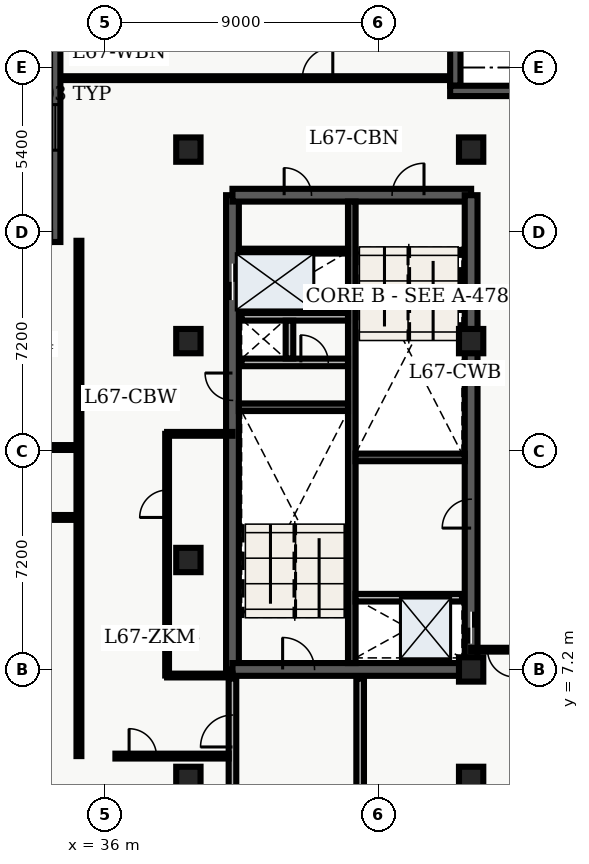
"""IFC4 building model, lengths in metres.
Left out: names, types, materials, properties, quantities, classifications, styles, units other than length and angle.
Written with IfcOpenShell. Run it as: python <this file> out.ifc"""

import sys

from ifc_helpers import new_model, entity, si_unit, converted_unit, direction, frame, origin_with_axes, origin_2d_with_axis, place, context, subcontext, project, spatial, polyline, rectangle, outline, extrude, element, fill, save


model = new_model("IFC4")
c1 = context("Model", 3, precision=1e-05, world=origin_with_axes(), true_north=direction((0.0, 1.0)))
c2 = subcontext(c1, "Body", "Model", "MODEL_VIEW")
j1 = project(units=[si_unit("LENGTHUNIT", "METRE"), converted_unit("PLANEANGLEUNIT", "DEGREE", entity("IfcPlaneAngleMeasure", 0.017), si_unit("PLANEANGLEUNIT", "RADIAN"), dimensions=[0, 0, 0, 0, 0, 0, 0])], contexts=[c1])
p1 = place(None, origin_with_axes())
s1 = spatial("IfcSite", under=j1, at=p1, CompositionType="ELEMENT")
p2 = place(p1, origin_with_axes())
s2 = spatial("IfcBuilding", under=s1, at=p2, CompositionType="ELEMENT")
p3 = place(p2, frame((0.0, 0.0, 272.4), z_axis=(0.0, 0.0, 1.0), x_axis=(1.0, 0.0, 0.0)))
s3 = spatial("IfcBuildingStorey", under=s2, at=p3, CompositionType="ELEMENT", Elevation=272.4)
p4 = place(p3, frame((40.2, 7.2, 0.0), z_axis=(0.0, 0.0, 1.0), x_axis=(0.0, 1.0, 0.0)))
e1 = element("IfcWall", 1, at=p4, inside=s3, PredefinedType="SHEAR", context=c2, shape_type="SweptSolid", body=[
    extrude(outline(polyline([(0.0, -0.21), (15.6, -0.21), (15.6, 0.21), (0.0, 0.21), (0.0, -0.21)])), origin_with_axes(), (0.0, 0.0, 1.0), 3.66),
])
p5 = place(p4, frame((12.75, 0.0, 0.0), z_axis=(0.0, 0.0, 1.0), x_axis=(1.0, 0.0, 0.0)))
e2 = element("IfcOpeningElement", 2, at=p5, cuts=e1, PredefinedType="OPENING", context=c2, shape_type="SweptSolid", body=[
    extrude(rectangle(XDim=1.2, YDim=0.44, at=origin_2d_with_axis()), origin_with_axes(), (0.0, 0.0, 1.0), 2.15),
])
p6 = place(p4, frame((9.3, 0.0, 0.0), z_axis=(0.0, 0.0, 1.0), x_axis=(1.0, 0.0, 0.0)))
e3 = element("IfcOpeningElement", 3, at=p6, cuts=e1, PredefinedType="OPENING", context=c2, shape_type="SweptSolid", body=[
    extrude(rectangle(XDim=0.9, YDim=0.44, at=origin_2d_with_axis()), origin_with_axes(), (0.0, 0.0, 1.0), 2.15),
])
p7 = place(p3, frame((40.2, 7.2, 0.0), z_axis=(0.0, 0.0, 1.0), x_axis=(1.0, 0.0, 0.0)))
e4 = element("IfcWall", 4, at=p7, inside=s3, PredefinedType="SHEAR", context=c2, shape_type="SweptSolid", body=[
    extrude(outline(polyline([(0.0, -0.21), (7.85, -0.21), (7.85, 0.21), (0.0, 0.21), (0.0, -0.21)])), origin_with_axes(), (0.0, 0.0, 1.0), 3.66),
])
p8 = place(p7, frame((2.175, 0.0, 0.0), z_axis=(0.0, 0.0, 1.0), x_axis=(1.0, 0.0, 0.0)))
e5 = element("IfcOpeningElement", 5, at=p8, cuts=e4, PredefinedType="OPENING", context=c2, shape_type="SweptSolid", body=[
    extrude(rectangle(XDim=1.05, YDim=0.44, at=origin_2d_with_axis()), origin_with_axes(), (0.0, 0.0, 1.0), 2.15),
])
p9 = place(p3, frame((40.2, 22.8, 0.0), z_axis=(0.0, 0.0, 1.0), x_axis=(1.0, 0.0, 0.0)))
e6 = element("IfcWall", 6, at=p9, inside=s3, PredefinedType="SHEAR", context=c2, shape_type="SweptSolid", body=[
    extrude(outline(polyline([(0.0, -0.21), (7.85, -0.21), (7.85, 0.21), (0.0, 0.21), (0.0, -0.21)])), origin_with_axes(), (0.0, 0.0, 1.0), 3.66),
])
p10 = place(p9, frame((5.775, 0.0, 0.0), z_axis=(0.0, 0.0, 1.0), x_axis=(1.0, 0.0, 0.0)))
e7 = element("IfcOpeningElement", 7, at=p10, cuts=e6, PredefinedType="OPENING", context=c2, shape_type="SweptSolid", body=[
    extrude(rectangle(XDim=1.05, YDim=0.44, at=origin_2d_with_axis()), origin_with_axes(), (0.0, 0.0, 1.0), 2.15),
])
p11 = place(p9, frame((2.15, 0.0, 0.0), z_axis=(0.0, 0.0, 1.0), x_axis=(1.0, 0.0, 0.0)))
e8 = element("IfcOpeningElement", 8, at=p11, cuts=e6, PredefinedType="OPENING", context=c2, shape_type="SweptSolid", body=[
    extrude(rectangle(XDim=0.9, YDim=0.44, at=origin_2d_with_axis()), origin_with_axes(), (0.0, 0.0, 1.0), 2.15),
])
p12 = place(p3, frame((48.05, 7.2, 0.0), z_axis=(0.0, 0.0, 1.0), x_axis=(0.0, 1.0, 0.0)))
e9 = element("IfcWall", 9, at=p12, inside=s3, PredefinedType="SHEAR", context=c2, shape_type="SweptSolid", body=[
    extrude(outline(polyline([(0.0, -0.21), (15.6, -0.21), (15.6, 0.21), (0.0, 0.21), (0.0, -0.21)])), origin_with_axes(), (0.0, 0.0, 1.0), 3.66),
])
p13 = place(p12, frame((1.375, 0.0, 0.0), z_axis=(0.0, 0.0, 1.0), x_axis=(1.0, 0.0, 0.0)))
e10 = element("IfcOpeningElement", 10, at=p13, cuts=e9, PredefinedType="OPENING", context=c2, shape_type="SweptSolid", body=[
    extrude(rectangle(XDim=1.05, YDim=0.44, at=origin_2d_with_axis()), origin_with_axes(), (0.0, 0.0, 1.0), 2.15),
])
p14 = place(p12, frame((5.125, 0.0, 0.0), z_axis=(0.0, 0.0, 1.0), x_axis=(1.0, 0.0, 0.0)))
e11 = element("IfcOpeningElement", 11, at=p14, cuts=e9, PredefinedType="OPENING", context=c2, shape_type="SweptSolid", body=[
    extrude(rectangle(XDim=0.95, YDim=0.44, at=origin_2d_with_axis()), origin_with_axes(), (0.0, 0.0, 1.0), 2.15),
])
p15 = place(p3, frame((44.125, 7.41, 0.0), z_axis=(0.0, 0.0, 1.0), x_axis=(0.0, 1.0, 0.0)))
e12 = element("IfcWall", 12, at=p15, inside=s3, PredefinedType="SHEAR", context=c2, shape_type="SweptSolid", body=[
    extrude(outline(polyline([(0.0, -0.125), (15.18, -0.125), (15.18, 0.125), (0.0, 0.125), (0.0, -0.125)])), origin_with_axes(), (0.0, 0.0, 1.0), 3.66),
])
for number, where, z_axis, x_axis in (
    (13, (40.41, 15.825, 0.0), (0.0, 0.0, 1.0), (1.0, 0.0, 0.0)),
    (14, (44.25, 14.175, 0.0), (0.0, 0.0, 1.0), (1.0, 0.0, 0.0)),
):
    element("IfcWall", number, at=place(p3, frame(where, z_axis=z_axis, x_axis=x_axis)), inside=s3, PredefinedType="SHEAR", context=c2, shape_type="SweptSolid", body=[
        extrude(outline(polyline([(0.0, -0.125), (3.59, -0.125), (3.59, 0.125), (0.0, 0.125), (0.0, -0.125)])), origin_with_axes(), (0.0, 0.0, 1.0), 3.66),
    ])
p16 = place(p3, frame((40.5, 17.3, 0.0), z_axis=(0.0, 0.0, 1.0), x_axis=(1.0, 0.0, 0.0)))
e15 = element("IfcWall", 15, at=p16, inside=s3, PredefinedType="SOLIDWALL", context=c2, shape_type="SweptSolid", body=[
    extrude(outline(polyline([(0.0, -0.125), (3.5, -0.125), (3.5, 0.125), (0.0, 0.125), (0.0, -0.125)])), origin_with_axes(), (0.0, 0.0, 1.0), 2.7),
])
p17 = place(p16, frame((2.4, 0.0, 0.0), z_axis=(0.0, 0.0, 1.0), x_axis=(1.0, 0.0, 0.0)))
e16 = element("IfcOpeningElement", 16, at=p17, cuts=e15, PredefinedType="OPENING", context=c2, shape_type="SweptSolid", body=[
    extrude(rectangle(XDim=0.9, YDim=0.27, at=origin_2d_with_axis()), origin_with_axes(), (0.0, 0.0, 1.0), 2.15),
])
p18 = place(p3, frame((40.5, 18.8, 0.0), z_axis=(0.0, 0.0, 1.0), x_axis=(1.0, 0.0, 0.0)))
e17 = element("IfcWall", 17, at=p18, inside=s3, PredefinedType="SOLIDWALL", context=c2, shape_type="SweptSolid", body=[
    extrude(outline(polyline([(0.0, -0.125), (3.5, -0.125), (3.5, 0.125), (0.0, 0.125), (0.0, -0.125)])), origin_with_axes(), (0.0, 0.0, 1.0), 2.7),
])
p19 = place(p3, frame((42.075, 17.43, 0.0), z_axis=(0.0, 0.0, 1.0), x_axis=(0.0, 1.0, 0.0)))
e18 = element("IfcWall", 18, at=p19, inside=s3, PredefinedType="SOLIDWALL", context=c2, shape_type="SweptSolid", body=[
    extrude(outline(polyline([(0.0, -0.125), (1.24, -0.125), (1.24, 0.125), (0.0, 0.125), (0.0, -0.125)])), origin_with_axes(), (0.0, 0.0, 1.0), 2.7),
])
p20 = place(p3, frame((40.2, 3.1, 0.0), z_axis=(0.0, 0.0, 1.0), x_axis=(0.0, 1.0, 0.0)))
e19 = element("IfcWall", 19, at=p20, inside=s3, PredefinedType="SOLIDWALL", context=c2, shape_type="SweptSolid", body=[
    extrude(outline(polyline([(0.0, -0.125), (3.8, -0.125), (3.8, 0.125), (0.0, 0.125), (0.0, -0.125)])), origin_with_axes(), (0.0, 0.0, 1.0), 2.7),
])
p21 = place(p20, frame((2.075, 0.0, 0.0), z_axis=(0.0, 0.0, 1.0), x_axis=(1.0, 0.0, 0.0)))
e20 = element("IfcOpeningElement", 20, at=p21, cuts=e19, PredefinedType="OPENING", context=c2, shape_type="SweptSolid", body=[
    extrude(rectangle(XDim=1.05, YDim=0.27, at=origin_2d_with_axis()), origin_with_axes(), (0.0, 0.0, 1.0), 2.15),
])
p22 = place(p3, frame((44.4, 3.1, 0.0), z_axis=(0.0, 0.0, 1.0), x_axis=(0.0, 1.0, 0.0)))
e21 = element("IfcWall", 21, at=p22, inside=s3, PredefinedType="SOLIDWALL", context=c2, shape_type="SweptSolid", body=[
    extrude(outline(polyline([(0.0, -0.125), (3.8, -0.125), (3.8, 0.125), (0.0, 0.125), (0.0, -0.125)])), origin_with_axes(), (0.0, 0.0, 1.0), 2.7),
])
for number, where, z_axis, x_axis in (
    (22, (38.75, 3.6, 0.0), (0.0, 0.0, 1.0), (1.0, 0.0, 0.0)),
    (23, (38.75, 10.8, 0.0), (0.0, 0.0, 1.0), (1.0, 0.0, 0.0)),
    (24, (38.75, 18.0, 0.0), (0.0, 0.0, 1.0), (1.0, 0.0, 0.0)),
    (25, (38.75, 24.3, 0.0), (0.0, 0.0, 1.0), (1.0, 0.0, 0.0)),
    (26, (48.05, 3.6, 0.0), (0.0, 0.0, 1.0), (1.0, 0.0, 0.0)),
    (27, (48.05, 7.2, 0.0), (0.0, 0.0, 1.0), (1.0, 0.0, 0.0)),
    (28, (48.05, 18.0, 0.0), (0.0, 0.0, 1.0), (1.0, 0.0, 0.0)),
    (29, (48.05, 24.3, 0.0), (0.0, 0.0, 1.0), (1.0, 0.0, 0.0)),
):
    element("IfcColumn", number, at=place(p3, frame(where, z_axis=z_axis, x_axis=x_axis)), inside=s3, PredefinedType="COLUMN", context=c2, shape_type="SweptSolid", body=[
        extrude(rectangle(XDim=0.8, YDim=0.8, at=origin_2d_with_axis()), origin_with_axes(), (0.0, 0.0, 1.0), 3.9),
    ])
p23 = place(p3, frame((40.5, 20.96, 0.0), z_axis=(0.0, 0.0, 1.0), x_axis=(1.0, 0.0, 0.0)))
e30 = element("IfcWall", 30, at=p23, inside=s3, PredefinedType="PARTITIONING", context=c2, shape_type="SweptSolid", body=[
    extrude(outline(polyline([(0.0, -0.08), (3.5, -0.08), (3.5, 0.08), (0.0, 0.08), (0.0, -0.08)])), origin_with_axes(), (0.0, 0.0, 1.0), 2.7),
])
p24 = place(p3, frame((44.25, 9.56, 0.0), z_axis=(0.0, 0.0, 1.0), x_axis=(1.0, 0.0, 0.0)))
e31 = element("IfcWall", 31, at=p24, inside=s3, PredefinedType="SOLIDWALL", context=c2, shape_type="SweptSolid", body=[
    extrude(outline(polyline([(0.0, -0.125), (3.5, -0.125), (3.5, 0.125), (0.0, 0.125), (0.0, -0.125)])), origin_with_axes(), (0.0, 0.0, 1.0), 2.7),
])
p25 = place(p3, frame((20.3, 12.2, 0.0), z_axis=(0.0, 0.0, 1.0), x_axis=(1.0, 0.0, 0.0)))
e32 = element("IfcWall", 32, at=p25, inside=s3, PredefinedType="PARTITIONING", context=c2, shape_type="SweptSolid", body=[
    extrude(outline(polyline([(0.0, -0.08), (14.85, -0.08), (14.85, 0.08), (0.0, 0.08), (0.0, -0.08)])), origin_with_axes(), (0.0, 0.0, 1.0), 2.7),
])
p26 = place(p25, frame((8.355, 0.0, 0.0), z_axis=(0.0, 0.0, 1.0), x_axis=(1.0, 0.0, 0.0)))
e33 = element("IfcOpeningElement", 33, at=p26, cuts=e32, PredefinedType="OPENING", context=c2, shape_type="SweptSolid", body=[
    extrude(rectangle(XDim=1.0, YDim=0.18, at=origin_2d_with_axis()), origin_with_axes(), (0.0, 0.0, 1.0), 2.15),
])
p27 = place(p3, frame((20.3, 14.5, 0.0), z_axis=(0.0, 0.0, 1.0), x_axis=(1.0, 0.0, 0.0)))
e34 = element("IfcWall", 34, at=p27, inside=s3, PredefinedType="PARTITIONING", context=c2, shape_type="SweptSolid", body=[
    extrude(outline(polyline([(0.0, -0.08), (14.85, -0.08), (14.85, 0.08), (0.0, 0.08), (0.0, -0.08)])), origin_with_axes(), (0.0, 0.0, 1.0), 2.7),
])
p28 = place(p27, frame((1.739, 0.0, 0.0), z_axis=(0.0, 0.0, 1.0), x_axis=(1.0, 0.0, 0.0)))
e35 = element("IfcOpeningElement", 35, at=p28, cuts=e34, PredefinedType="OPENING", context=c2, shape_type="SweptSolid", body=[
    extrude(rectangle(XDim=1.0, YDim=0.18, at=origin_2d_with_axis()), origin_with_axes(), (0.0, 0.0, 1.0), 2.15),
])
p29 = place(p27, frame((5.299, 0.0, 0.0), z_axis=(0.0, 0.0, 1.0), x_axis=(1.0, 0.0, 0.0)))
e36 = element("IfcOpeningElement", 36, at=p29, cuts=e34, PredefinedType="OPENING", context=c2, shape_type="SweptSolid", body=[
    extrude(rectangle(XDim=1.0, YDim=0.18, at=origin_2d_with_axis()), origin_with_axes(), (0.0, 0.0, 1.0), 2.15),
])
p30 = place(p27, frame((8.889, 0.0, 0.0), z_axis=(0.0, 0.0, 1.0), x_axis=(1.0, 0.0, 0.0)))
e37 = element("IfcOpeningElement", 37, at=p30, cuts=e34, PredefinedType="OPENING", context=c2, shape_type="SweptSolid", body=[
    extrude(rectangle(XDim=1.0, YDim=0.18, at=origin_2d_with_axis()), origin_with_axes(), (0.0, 0.0, 1.0), 2.15),
])
p31 = place(p27, frame((12.624, 0.0, 0.0), z_axis=(0.0, 0.0, 1.0), x_axis=(1.0, 0.0, 0.0)))
e38 = element("IfcOpeningElement", 38, at=p31, cuts=e34, PredefinedType="OPENING", context=c2, shape_type="SweptSolid", body=[
    extrude(rectangle(XDim=1.0, YDim=0.18, at=origin_2d_with_axis()), origin_with_axes(), (0.0, 0.0, 1.0), 2.15),
])
p32 = place(p3, frame((35.15, 4.35, 0.0), z_axis=(0.0, 0.0, 1.0), x_axis=(0.0, 1.0, 0.0)))
e39 = element("IfcWall", 39, at=p32, inside=s3, PredefinedType="PARTITIONING", context=c2, shape_type="SweptSolid", body=[
    extrude(outline(polyline([(0.0, -0.08), (16.95, -0.08), (16.95, 0.08), (0.0, 0.08), (0.0, -0.08)])), origin_with_axes(), (0.0, 0.0, 1.0), 2.7),
])
p33 = place(p3, frame((49.765, 7.85, 0.0), z_axis=(0.0, 0.0, 1.0), x_axis=(-1.0, 0.0, 0.0)))
e40 = element("IfcWall", 40, at=p33, inside=s3, PredefinedType="PARTITIONING", context=c2, shape_type="SweptSolid", body=[
    extrude(outline(polyline([(0.0, -0.062), (1.715, -0.062), (1.715, 0.062), (0.0, 0.062), (0.0, -0.062)])), origin_with_axes(), (0.0, 0.0, 1.0), 2.7),
])
p34 = place(p33, frame((0.725, 0.0, 0.0), z_axis=(0.0, 0.0, 1.0), x_axis=(1.0, 0.0, 0.0)))
e41 = element("IfcOpeningElement", 41, at=p34, cuts=e40, PredefinedType="OPENING", context=c2, shape_type="SweptSolid", body=[
    extrude(rectangle(XDim=0.9, YDim=0.145, at=origin_2d_with_axis()), origin_with_axes(), (0.0, 0.0, 1.0), 2.15),
])
p35 = place(p3, frame((34.535, 26.65, 0.0), z_axis=(0.0, 0.0, 1.0), x_axis=(1.0, 0.0, 0.0)))
e42 = element("IfcWall", 42, at=p35, inside=s3, PredefinedType="PARTITIONING", context=c2, shape_type="SweptSolid", body=[
    extrude(outline(polyline([(0.0, -0.062), (12.995, -0.062), (12.995, 0.062), (0.0, 0.062), (0.0, -0.062)])), origin_with_axes(), (0.0, 0.0, 1.0), 2.7),
])
p36 = place(p35, frame((8.465, 0.0, 0.0), z_axis=(0.0, 0.0, 1.0), x_axis=(1.0, 0.0, 0.0)))
e43 = element("IfcOpeningElement", 43, at=p36, cuts=e42, PredefinedType="OPENING", context=c2, shape_type="SweptSolid", body=[
    extrude(rectangle(XDim=1.0, YDim=0.145, at=origin_2d_with_axis()), origin_with_axes(), (0.0, 0.0, 1.0), 2.15),
])
p37 = place(p3, frame((36.35, 4.35, 0.0), z_axis=(0.0, 0.0, 1.0), x_axis=(1.0, 0.0, 0.0)))
e44 = element("IfcWall", 44, at=p37, inside=s3, PredefinedType="PARTITIONING", context=c2, shape_type="SweptSolid", body=[
    extrude(outline(polyline([(0.0, -0.08), (3.725, -0.08), (3.725, 0.08), (0.0, 0.08), (0.0, -0.08)])), origin_with_axes(), (0.0, 0.0, 1.0), 2.7),
])
p38 = place(p37, frame((0.9, 0.0, 0.0), z_axis=(0.0, 0.0, 1.0), x_axis=(1.0, 0.0, 0.0)))
e45 = element("IfcOpeningElement", 45, at=p38, cuts=e44, PredefinedType="OPENING", context=c2, shape_type="SweptSolid", body=[
    extrude(rectangle(XDim=0.9, YDim=0.18, at=origin_2d_with_axis()), origin_with_axes(), (0.0, 0.0, 1.0), 2.15),
])
for number, where, z_axis, x_axis in (
    (46, (38.05, 7.0, 0.0), (0.0, 0.0, 1.0), (1.0, 0.0, 0.0)),
    (47, (38.05, 14.95, 0.0), (0.0, 0.0, 1.0), (1.0, 0.0, 0.0)),
):
    element("IfcWall", number, at=place(p3, frame(where, z_axis=z_axis, x_axis=x_axis)), inside=s3, PredefinedType="PARTITIONING", context=c2, shape_type="SweptSolid", body=[
        extrude(outline(polyline([(0.0, -0.062), (2.15, -0.062), (2.15, 0.062), (0.0, 0.062), (0.0, -0.062)])), origin_with_axes(), (0.0, 0.0, 1.0), 2.7),
    ])
p39 = place(p3, frame((38.05, 7.0, 0.0), z_axis=(0.0, 0.0, 1.0), x_axis=(0.0, 1.0, 0.0)))
e48 = element("IfcWall", 48, at=p39, inside=s3, PredefinedType="PARTITIONING", context=c2, shape_type="SweptSolid", body=[
    extrude(outline(polyline([(0.0, -0.062), (7.95, -0.062), (7.95, 0.062), (0.0, 0.062), (0.0, -0.062)])), origin_with_axes(), (0.0, 0.0, 1.0), 2.7),
])
p40 = place(p39, frame((5.65, 0.0, 0.0), z_axis=(0.0, 0.0, 1.0), x_axis=(1.0, 0.0, 0.0)))
e49 = element("IfcOpeningElement", 49, at=p40, cuts=e48, PredefinedType="OPENING", context=c2, shape_type="SweptSolid", body=[
    extrude(rectangle(XDim=0.9, YDim=0.145, at=origin_2d_with_axis()), origin_with_axes(), (0.0, 0.0, 1.0), 2.15),
])
p41 = place(p3, frame((34.37, 21.26, 0.0), z_axis=(0.0, 0.0, 1.0), x_axis=(0.0, 1.0, 0.0)))
e50 = element("IfcWall", 50, at=p41, inside=s3, PredefinedType="SOLIDWALL", context=c2, shape_type="SweptSolid", body=[
    extrude(outline(polyline([(0.0, -0.17), (7.54, -0.17), (7.54, 0.17), (0.0, 0.17), (0.0, -0.17)])), origin_with_axes(), (0.0, 0.0, 1.0), 3.66),
])
p42 = place(p41, frame((3.77, 0.0, 0.45), z_axis=(0.0, 0.0, 1.0), x_axis=(1.0, 0.0, 0.0)))
e51 = element("IfcOpeningElement", 51, at=p42, cuts=e50, PredefinedType="OPENING", context=c2, shape_type="SweptSolid", body=[
    extrude(rectangle(XDim=1.5, YDim=0.36, at=origin_2d_with_axis()), origin_with_axes(), (0.0, 0.0, 1.0), 2.1),
])
p43 = place(p3, frame((47.53, 28.46, 0.0), z_axis=(0.0, 0.0, 1.0), x_axis=(0.0, -1.0, 0.0)))
e52 = element("IfcWall", 52, at=p43, inside=s3, PredefinedType="SOLIDWALL", context=c2, shape_type="SweptSolid", body=[
    extrude(outline(polyline([(0.0, -0.17), (2.06, -0.17), (2.06, 0.17), (0.0, 0.17), (0.0, -0.17)])), origin_with_axes(), (0.0, 0.0, 1.0), 3.66),
])
p44 = place(p3, frame((47.36, 26.23, 0.0), z_axis=(0.0, 0.0, 1.0), x_axis=(1.0, 0.0, 0.0)))
e53 = element("IfcWall", 53, at=p44, inside=s3, PredefinedType="SOLIDWALL", context=c2, shape_type="SweptSolid", body=[
    extrude(outline(polyline([(0.0, -0.17), (2.74, -0.17), (2.74, 0.17), (0.0, 0.17), (0.0, -0.17)])), origin_with_axes(), (0.0, 0.0, 1.0), 3.66),
])
p45 = place(p12, frame((1.375, 0.0, 0.0), z_axis=(0.0, 0.0, 1.0), x_axis=(1.0, 0.0, 0.0)))
e54 = element("IfcDoor", 54, at=p45, inside=s3, OperationType="SLIDING_TO_LEFT", PredefinedType="DOOR", context=c2, shape_type="SweptSolid", body=[
    extrude(rectangle(XDim=1.05, YDim=0.09, at=origin_2d_with_axis()), origin_with_axes(), (0.0, 0.0, 1.0), 2.15),
])
fill(e10, e54)
p46 = place(p4, frame((12.75, 0.0, 0.0), z_axis=(0.0, 0.0, 1.0), x_axis=(1.0, 0.0, 0.0)))
e55 = element("IfcDoor", 55, at=p46, inside=s3, OperationType="DOUBLE_DOOR_SLIDING", PredefinedType="DOOR", context=c2, shape_type="SweptSolid", body=[
    extrude(rectangle(XDim=1.2, YDim=0.09, at=origin_2d_with_axis()), origin_with_axes(), (0.0, 0.0, 1.0), 2.15),
])
fill(e2, e55)
p47 = place(p4, frame((9.3, 0.0, 0.0), z_axis=(0.0, 0.0, 1.0), x_axis=(1.0, 0.0, 0.0)))
e56 = element("IfcDoor", 56, at=p47, inside=s3, OperationType="SINGLE_SWING_RIGHT", PredefinedType="DOOR", context=c2, shape_type="SweptSolid", body=[
    extrude(rectangle(XDim=0.9, YDim=0.09, at=origin_2d_with_axis()), origin_with_axes(), (0.0, 0.0, 1.0), 2.15),
])
fill(e3, e56)
p48 = place(p16, frame((2.4, 0.0, 0.0), z_axis=(0.0, 0.0, 1.0), x_axis=(1.0, 0.0, 0.0)))
e57 = element("IfcDoor", 57, at=p48, inside=s3, OperationType="SINGLE_SWING_LEFT", PredefinedType="DOOR", context=c2, shape_type="SweptSolid", body=[
    extrude(rectangle(XDim=0.9, YDim=0.09, at=origin_2d_with_axis()), origin_with_axes(), (0.0, 0.0, 1.0), 2.15),
])
fill(e16, e57)
p49 = place(p7, frame((2.175, 0.0, 0.0), z_axis=(0.0, 0.0, 1.0), x_axis=(1.0, 0.0, 0.0)))
e58 = element("IfcDoor", 58, at=p49, inside=s3, OperationType="SINGLE_SWING_LEFT", PredefinedType="DOOR", context=c2, shape_type="SweptSolid", body=[
    extrude(rectangle(XDim=1.05, YDim=0.09, at=origin_2d_with_axis()), origin_with_axes(), (0.0, 0.0, 1.0), 2.15),
])
fill(e5, e58)
p50 = place(p9, frame((5.775, 0.0, 0.0), z_axis=(0.0, 0.0, 1.0), x_axis=(1.0, 0.0, 0.0)))
e59 = element("IfcDoor", 59, at=p50, inside=s3, OperationType="SINGLE_SWING_RIGHT", PredefinedType="DOOR", context=c2, shape_type="SweptSolid", body=[
    extrude(rectangle(XDim=1.05, YDim=0.09, at=origin_2d_with_axis()), origin_with_axes(), (0.0, 0.0, 1.0), 2.15),
])
fill(e7, e59)
p51 = place(p20, frame((2.075, 0.0, 0.0), z_axis=(0.0, 0.0, 1.0), x_axis=(1.0, 0.0, 0.0)))
e60 = element("IfcDoor", 60, at=p51, inside=s3, OperationType="SINGLE_SWING_LEFT", PredefinedType="DOOR", context=c2, shape_type="SweptSolid", body=[
    extrude(rectangle(XDim=1.05, YDim=0.09, at=origin_2d_with_axis()), origin_with_axes(), (0.0, 0.0, 1.0), 2.15),
])
fill(e20, e60)
p52 = place(p9, frame((2.15, 0.0, 0.0), z_axis=(0.0, 0.0, 1.0), x_axis=(1.0, 0.0, 0.0)))
e61 = element("IfcDoor", 61, at=p52, inside=s3, OperationType="SINGLE_SWING_LEFT", PredefinedType="DOOR", context=c2, shape_type="SweptSolid", body=[
    extrude(rectangle(XDim=0.9, YDim=0.09, at=origin_2d_with_axis()), origin_with_axes(), (0.0, 0.0, 1.0), 2.15),
])
fill(e8, e61)
p53 = place(p12, frame((5.125, 0.0, 0.0), z_axis=(0.0, 0.0, 1.0), x_axis=(1.0, 0.0, 0.0)))
e62 = element("IfcDoor", 62, at=p53, inside=s3, OperationType="SINGLE_SWING_LEFT", PredefinedType="DOOR", context=c2, shape_type="SweptSolid", body=[
    extrude(rectangle(XDim=0.95, YDim=0.09, at=origin_2d_with_axis()), origin_with_axes(), (0.0, 0.0, 1.0), 2.15),
])
fill(e11, e62)
p54 = place(p33, frame((0.725, 0.0, 0.0), z_axis=(0.0, 0.0, 1.0), x_axis=(1.0, 0.0, 0.0)))
e63 = element("IfcDoor", 63, at=p54, inside=s3, OperationType="SINGLE_SWING_LEFT", PredefinedType="DOOR", context=c2, shape_type="SweptSolid", body=[
    extrude(rectangle(XDim=0.9, YDim=0.075, at=origin_2d_with_axis()), origin_with_axes(), (0.0, 0.0, 1.0), 2.15),
])
fill(e41, e63)
p55 = place(p35, frame((8.465, 0.0, 0.0), z_axis=(0.0, 0.0, 1.0), x_axis=(1.0, 0.0, 0.0)))
e64 = element("IfcDoor", 64, at=p55, inside=s3, OperationType="SINGLE_SWING_RIGHT", PredefinedType="DOOR", context=c2, shape_type="SweptSolid", body=[
    extrude(rectangle(XDim=1.0, YDim=0.075, at=origin_2d_with_axis()), origin_with_axes(), (0.0, 0.0, 1.0), 2.15),
])
fill(e43, e64)
p56 = place(p37, frame((0.9, 0.0, 0.0), z_axis=(0.0, 0.0, 1.0), x_axis=(1.0, 0.0, 0.0)))
e65 = element("IfcDoor", 65, at=p56, inside=s3, OperationType="SINGLE_SWING_LEFT", PredefinedType="DOOR", context=c2, shape_type="SweptSolid", body=[
    extrude(rectangle(XDim=0.9, YDim=0.09, at=origin_2d_with_axis()), origin_with_axes(), (0.0, 0.0, 1.0), 2.15),
])
fill(e45, e65)
p57 = place(p39, frame((5.65, 0.0, 0.0), z_axis=(0.0, 0.0, 1.0), x_axis=(1.0, 0.0, 0.0)))
e66 = element("IfcDoor", 66, at=p57, inside=s3, OperationType="SINGLE_SWING_LEFT", PredefinedType="DOOR", context=c2, shape_type="SweptSolid", body=[
    extrude(rectangle(XDim=0.9, YDim=0.075, at=origin_2d_with_axis()), origin_with_axes(), (0.0, 0.0, 1.0), 2.15),
])
fill(e49, e66)
p58 = place(p41, frame((3.77, 0.0, 0.45), z_axis=(0.0, 0.0, 1.0), x_axis=(1.0, 0.0, 0.0)))
e67 = element("IfcWindow", 67, at=p58, inside=s3, PredefinedType="WINDOW", context=c2, shape_type="SweptSolid", body=[
    extrude(rectangle(XDim=1.5, YDim=0.09, at=origin_2d_with_axis()), origin_with_axes(), (0.0, 0.0, 1.0), 2.1),
])
fill(e51, e67)
save(model, sys.argv[1])
